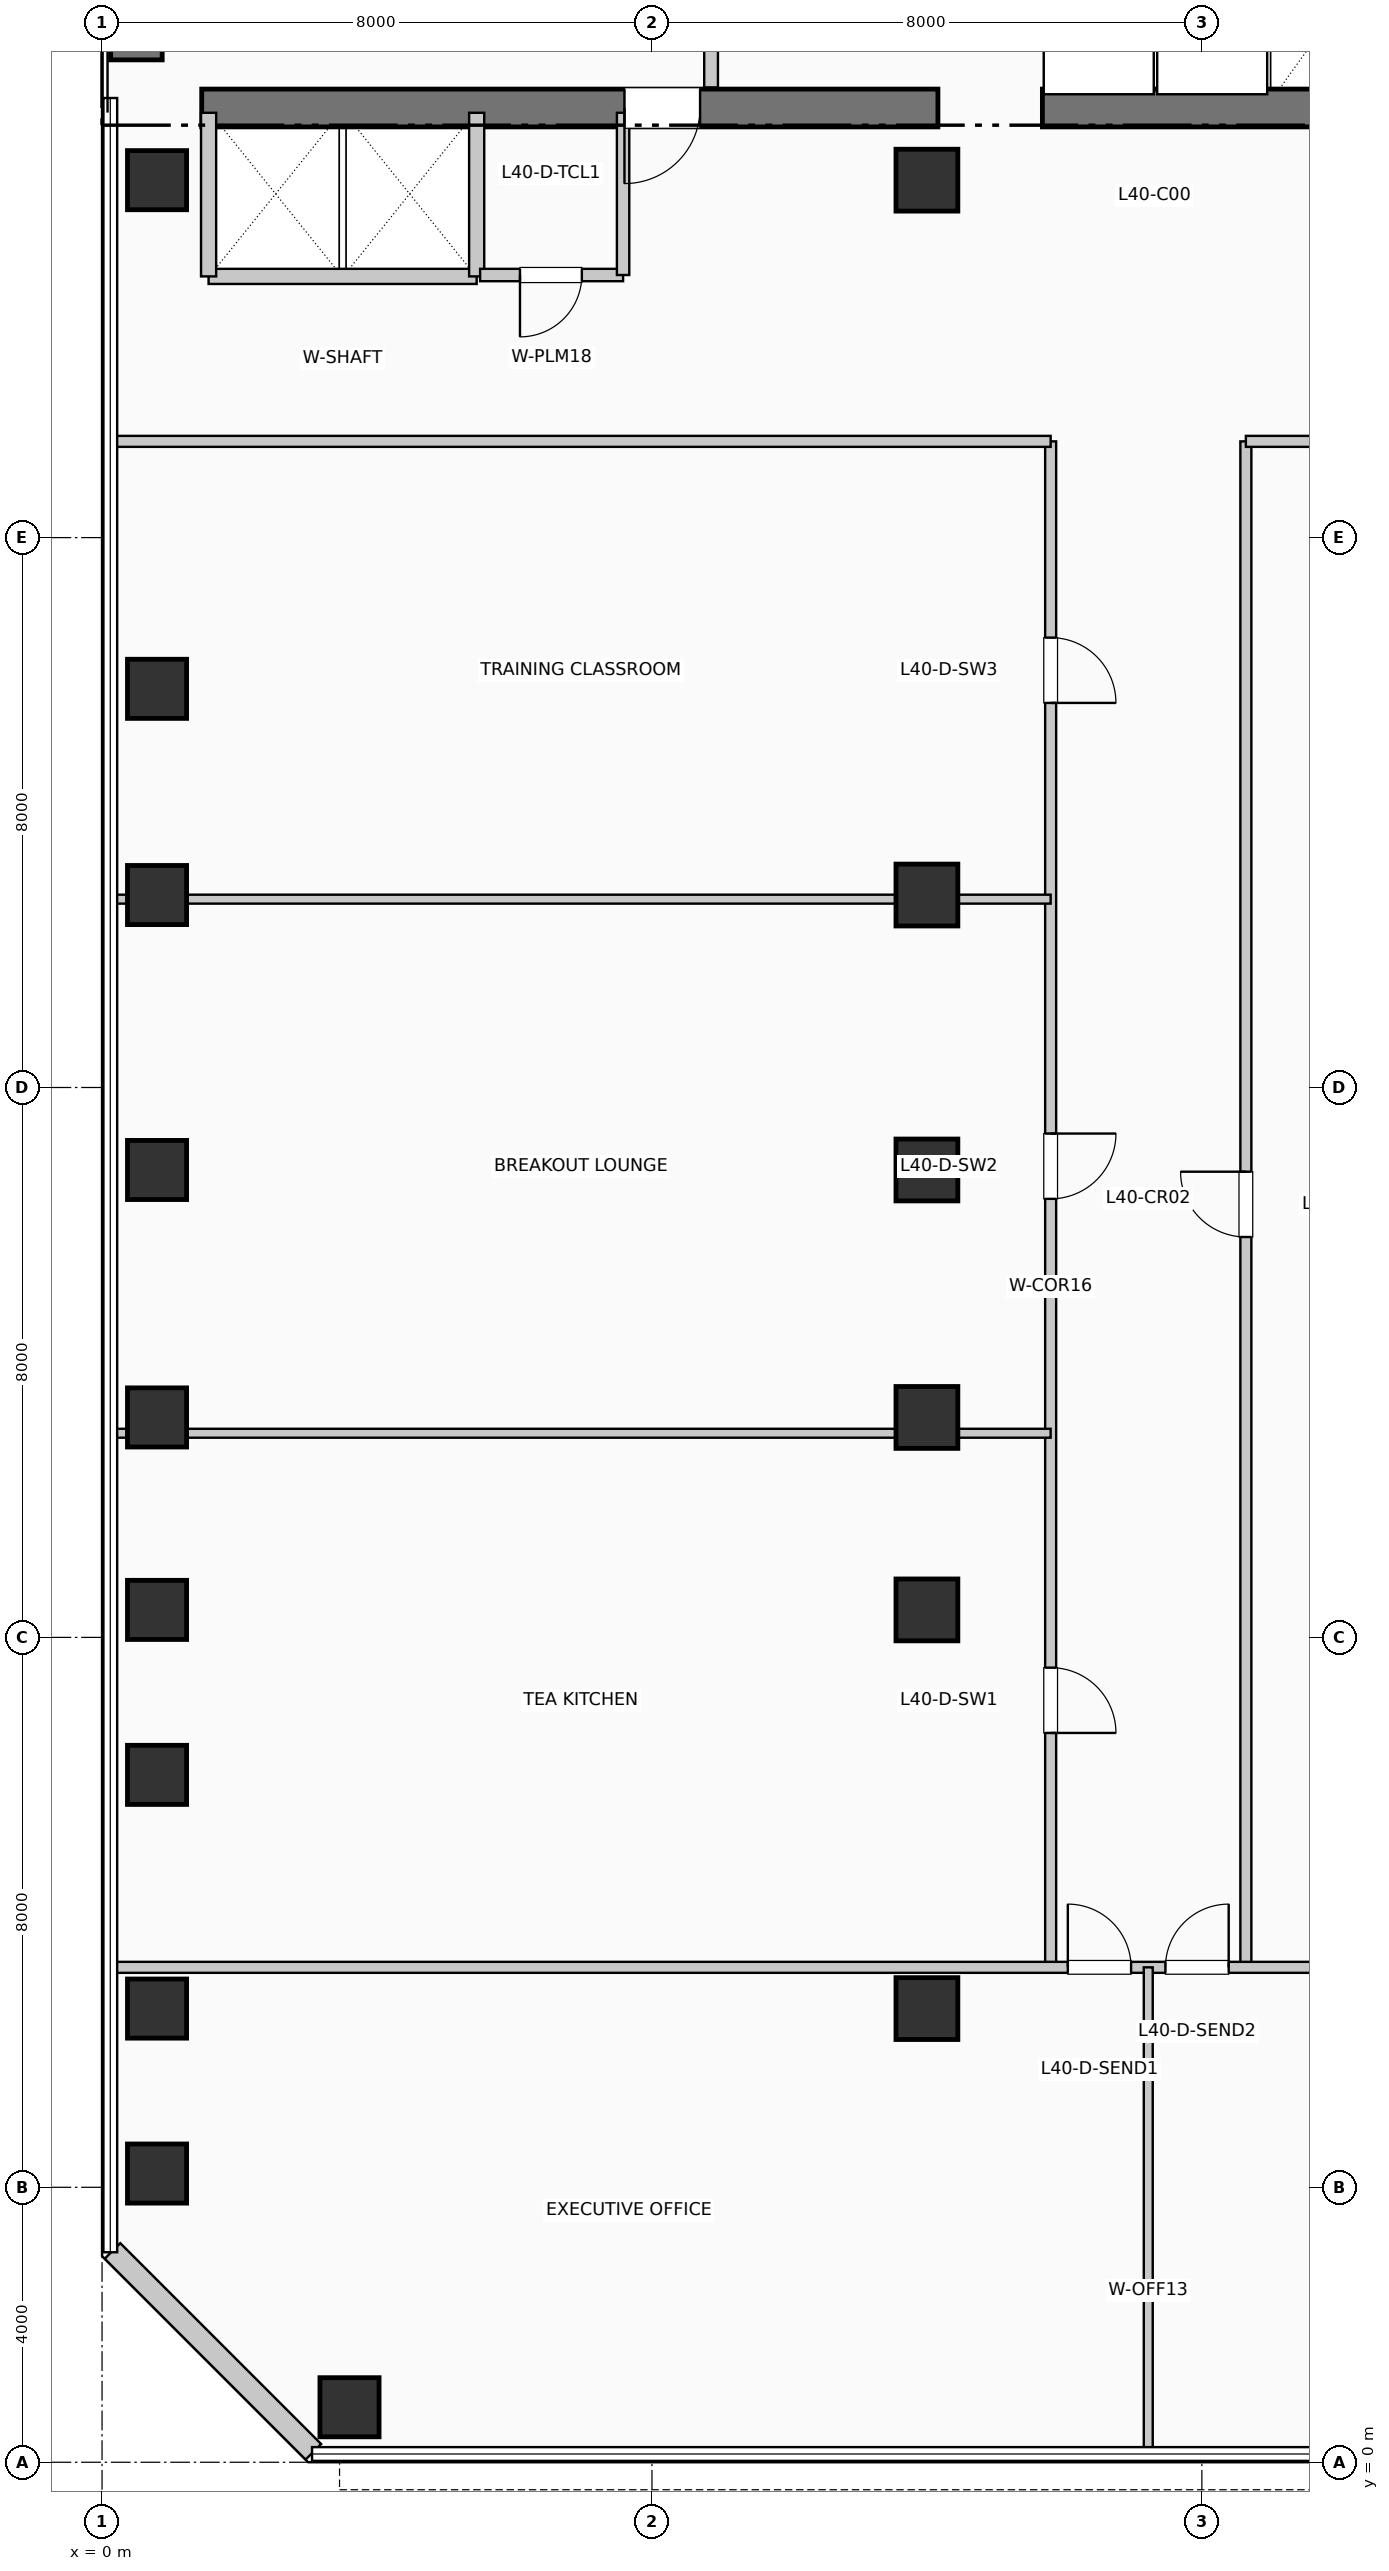
"""IFC4 building model, lengths in metres.
Left out: names, types, materials, properties, quantities, classifications, styles, units other than length and angle.
Written with IfcOpenShell. Run it as: python <this file> out.ifc"""

import sys

from ifc_helpers import new_model, si_unit, direction, frame, frame_2d, origin, origin_2d, place, context, subcontext, project, spatial, rectangle, extrude, element, fill, save


model = new_model("IFC4")
c1 = context("Model", 3, precision=1e-05, world=origin(), true_north=direction((0.0, 1.0)))
c2 = subcontext(c1, "Body", "Model", "MODEL_VIEW")
j1 = project(units=[si_unit("LENGTHUNIT", "METRE"), si_unit("PLANEANGLEUNIT", "RADIAN")], contexts=[c1])
p1 = place(None, origin())
s1 = spatial("IfcSite", under=j1, at=p1, CompositionType="ELEMENT")
p2 = place(p1, origin())
s2 = spatial("IfcBuilding", under=s1, at=p2, CompositionType="ELEMENT")
p3 = place(p2, frame((0.0, 0.0, 166.65)))
s3 = spatial("IfcBuildingStorey", under=s2, at=p3, CompositionType="ELEMENT", Elevation=166.65)
p4 = place(p3, frame((0.5, 34.95, 0.0), z_axis=(0.0, 0.0, 1.0), x_axis=(0.0, 1.0, 0.0)))
e1 = element("IfcWall", 1, at=p4, inside=s3, PredefinedType="SHEAR", context=c2, shape_type="SweptSolid", body=[
    extrude(rectangle(XDim=7.9, YDim=0.75, at=frame_2d((3.95, 0.0))), origin(), (0.0, 0.0, 1.0), 3.96),
])
p5 = place(p3, frame((1.45, 34.25, 0.0), z_axis=(0.0, 0.0, 1.0), x_axis=(1.0, 0.0, 0.0)))
e2 = element("IfcWall", 2, at=p5, inside=s3, PredefinedType="SHEAR", context=c2, shape_type="SweptSolid", body=[
    extrude(rectangle(XDim=10.71, YDim=0.55, at=frame_2d((5.355, 0.0))), origin(), (0.0, 0.0, 1.0), 3.96),
])
p6 = place(p5, frame((7.25, 0.0, 0.0), z_axis=(0.0, 0.0, 1.0), x_axis=(-1.0, 0.0, 0.0)))
e3 = element("IfcOpeningElement", 3, at=p6, cuts=e2, PredefinedType="OPENING", context=c2, shape_type="SweptSolid", body=[
    extrude(rectangle(XDim=1.1, YDim=2.15, at=frame_2d((0.55, 1.075))), frame((0.0, 0.285, 0.0), z_axis=(0.0, -1.0, 0.0), x_axis=(1.0, 0.0, 0.0)), (0.0, 0.0, 1.0), 0.57),
])
p7 = place(p3, frame((13.68, 34.25, 0.0), z_axis=(0.0, 0.0, 1.0), x_axis=(1.0, 0.0, 0.0)))
e4 = element("IfcWall", 4, at=p7, inside=s3, PredefinedType="SHEAR", context=c2, shape_type="SweptSolid", body=[
    extrude(rectangle(XDim=6.12, YDim=0.55, at=frame_2d((3.06, 0.0))), origin(), (0.0, 0.0, 1.0), 3.96),
])
for number, where, z_axis, x_axis in (
    (5, (0.8, 4.2, 0.0), (0.0, 0.0, 1.0), (1.0, 0.0, 0.0)),
    (6, (0.8, 6.6, 0.0), (0.0, 0.0, 1.0), (1.0, 0.0, 0.0)),
    (7, (0.8, 10.0, 0.0), (0.0, 0.0, 1.0), (1.0, 0.0, 0.0)),
    (8, (0.8, 12.4, 0.0), (0.0, 0.0, 1.0), (1.0, 0.0, 0.0)),
    (9, (0.8, 15.2, 0.0), (0.0, 0.0, 1.0), (1.0, 0.0, 0.0)),
    (10, (0.8, 18.8, 0.0), (0.0, 0.0, 1.0), (1.0, 0.0, 0.0)),
    (11, (0.8, 22.8, 0.0), (0.0, 0.0, 1.0), (1.0, 0.0, 0.0)),
    (12, (0.8, 25.8, 0.0), (0.0, 0.0, 1.0), (1.0, 0.0, 0.0)),
    (13, (0.8, 33.2, 0.0), (0.0, 0.0, 1.0), (1.0, 0.0, 0.0)),
    (14, (3.6, 0.8, 0.0), (0.0, 0.0, 1.0), (1.0, 0.0, 0.0)),
):
    element("IfcColumn", number, at=place(p3, frame(where, z_axis=z_axis, x_axis=x_axis)), inside=s3, PredefinedType="COLUMN", context=c2, shape_type="SweptSolid", body=[
        extrude(rectangle(XDim=0.86, YDim=0.86, at=origin_2d()), origin(), (0.0, 0.0, 1.0), 3.96),
    ])
for number, where, z_axis, x_axis in (
    (15, (12.0, 6.6, 0.0), (0.0, 0.0, 1.0), (1.0, 0.0, 0.0)),
    (16, (12.0, 12.4, 0.0), (0.0, 0.0, 1.0), (1.0, 0.0, 0.0)),
    (17, (12.0, 15.2, 0.0), (0.0, 0.0, 1.0), (1.0, 0.0, 0.0)),
    (18, (12.0, 18.8, 0.0), (0.0, 0.0, 1.0), (1.0, 0.0, 0.0)),
    (19, (12.0, 22.8, 0.0), (0.0, 0.0, 1.0), (1.0, 0.0, 0.0)),
    (20, (12.0, 33.2, 0.0), (0.0, 0.0, 1.0), (1.0, 0.0, 0.0)),
):
    element("IfcColumn", number, at=place(p3, frame(where, z_axis=z_axis, x_axis=x_axis)), inside=s3, PredefinedType="COLUMN", context=c2, shape_type="SweptSolid", body=[
        extrude(rectangle(XDim=0.9, YDim=0.9, at=origin_2d()), origin(), (0.0, 0.0, 1.0), 3.96),
    ])
p8 = place(p3, frame((0.152, 3.074, 0.0), z_axis=(0.0, 0.0, 1.0), x_axis=(0.707106781187, -0.707106781187, 0.0)))
e21 = element("IfcWall", 21, at=p8, inside=s3, PredefinedType="SOLIDWALL", context=c2, shape_type="SweptSolid", body=[
    extrude(rectangle(XDim=4.133, YDim=0.32, at=frame_2d((2.066, 0.0))), origin(), (0.0, 0.0, 1.0), 3.71),
])
p9 = place(p3, frame((8.86, 34.55, 0.0), z_axis=(0.0, 0.0, 1.0), x_axis=(0.0, 1.0, 0.0)))
e22 = element("IfcWall", 22, at=p9, inside=s3, PredefinedType="PARTITIONING", context=c2, shape_type="SweptSolid", body=[
    extrude(rectangle(XDim=2.5, YDim=0.2, at=frame_2d((1.25, 0.0))), origin(), (0.0, 0.0, 1.0), 3.71),
])
p10 = place(p3, frame((1.55, 31.8, 0.0), z_axis=(0.0, 0.0, 1.0), x_axis=(1.0, 0.0, 0.0)))
e23 = element("IfcWall", 23, at=p10, inside=s3, PredefinedType="PARTITIONING", context=c2, shape_type="SweptSolid", body=[
    extrude(rectangle(XDim=3.9, YDim=0.22, at=frame_2d((1.95, 0.0))), origin(), (0.0, 0.0, 1.0), 3.71),
])
for number, where, z_axis, x_axis in (
    (24, (1.55, 31.8, 0.0), (0.0, 0.0, 1.0), (0.0, 1.0, 0.0)),
    (25, (5.45, 31.8, 0.0), (0.0, 0.0, 1.0), (0.0, 1.0, 0.0)),
):
    element("IfcWall", number, at=place(p3, frame(where, z_axis=z_axis, x_axis=x_axis)), inside=s3, PredefinedType="PARTITIONING", context=c2, shape_type="SweptSolid", body=[
        extrude(rectangle(XDim=2.38, YDim=0.22, at=frame_2d((1.19, 0.0))), origin(), (0.0, 0.0, 1.0), 3.71),
    ])
p11 = place(p3, frame((5.5, 31.82, 0.0), z_axis=(0.0, 0.0, 1.0), x_axis=(1.0, 0.0, 0.0)))
e26 = element("IfcWall", 26, at=p11, inside=s3, PredefinedType="PLUMBINGWALL", context=c2, shape_type="SweptSolid", body=[
    extrude(rectangle(XDim=2.08, YDim=0.18, at=frame_2d((1.04, 0.0))), origin(), (0.0, 0.0, 1.0), 3.71),
])
p12 = place(p11, frame((1.48, 0.0, 0.0), z_axis=(0.0, 0.0, 1.0), x_axis=(-1.0, 0.0, 0.0)))
e27 = element("IfcOpeningElement", 27, at=p12, cuts=e26, PredefinedType="OPENING", context=c2, shape_type="SweptSolid", body=[
    extrude(rectangle(XDim=0.9, YDim=2.1, at=frame_2d((0.45, 1.05))), frame((0.0, 0.1, 0.0), z_axis=(0.0, -1.0, 0.0), x_axis=(1.0, 0.0, 0.0)), (0.0, 0.0, 1.0), 0.2),
])
p13 = place(p3, frame((7.58, 31.82, 0.0), z_axis=(0.0, 0.0, 1.0), x_axis=(0.0, 1.0, 0.0)))
e28 = element("IfcWall", 28, at=p13, inside=s3, PredefinedType="PLUMBINGWALL", context=c2, shape_type="SweptSolid", body=[
    extrude(rectangle(XDim=2.36, YDim=0.18, at=frame_2d((1.18, 0.0))), origin(), (0.0, 0.0, 1.0), 3.71),
])
p14 = place(p3, frame((13.8, 7.2, 0.0), z_axis=(0.0, 0.0, 1.0), x_axis=(0.0, 1.0, 0.0)))
e29 = element("IfcWall", 29, at=p14, inside=s3, PredefinedType="PARTITIONING", context=c2, shape_type="SweptSolid", body=[
    extrude(rectangle(XDim=22.2, YDim=0.16, at=frame_2d((11.1, 0.0))), origin(), (0.0, 0.0, 1.0), 3.71),
])
p15 = place(p14, frame((4.36, 0.0, 0.0), z_axis=(0.0, 0.0, 1.0), x_axis=(-1.0, 0.0, 0.0)))
e30 = element("IfcOpeningElement", 30, at=p15, cuts=e29, PredefinedType="OPENING", context=c2, shape_type="SweptSolid", body=[
    extrude(rectangle(XDim=0.95, YDim=2.15, at=frame_2d((0.475, 1.075))), frame((0.0, 0.09, 0.0), z_axis=(0.0, -1.0, 0.0), x_axis=(1.0, 0.0, 0.0)), (0.0, 0.0, 1.0), 0.18),
])
p16 = place(p14, frame((12.13, 0.0, 0.0), z_axis=(0.0, 0.0, 1.0), x_axis=(-1.0, 0.0, 0.0)))
e31 = element("IfcOpeningElement", 31, at=p16, cuts=e29, PredefinedType="OPENING", context=c2, shape_type="SweptSolid", body=[
    extrude(rectangle(XDim=0.95, YDim=2.15, at=frame_2d((0.475, 1.075))), frame((0.0, 0.09, 0.0), z_axis=(0.0, -1.0, 0.0), x_axis=(1.0, 0.0, 0.0)), (0.0, 0.0, 1.0), 0.18),
])
p17 = place(p14, frame((19.345, 0.0, 0.0), z_axis=(0.0, 0.0, 1.0), x_axis=(-1.0, 0.0, 0.0)))
e32 = element("IfcOpeningElement", 32, at=p17, cuts=e29, PredefinedType="OPENING", context=c2, shape_type="SweptSolid", body=[
    extrude(rectangle(XDim=0.95, YDim=2.15, at=frame_2d((0.475, 1.075))), frame((0.0, 0.09, 0.0), z_axis=(0.0, -1.0, 0.0), x_axis=(1.0, 0.0, 0.0)), (0.0, 0.0, 1.0), 0.18),
])
p18 = place(p3, frame((16.64, 7.2, 0.0), z_axis=(0.0, 0.0, 1.0), x_axis=(0.0, 1.0, 0.0)))
e33 = element("IfcWall", 33, at=p18, inside=s3, PredefinedType="PARTITIONING", context=c2, shape_type="SweptSolid", body=[
    extrude(rectangle(XDim=22.2, YDim=0.16, at=frame_2d((11.1, 0.0))), origin(), (0.0, 0.0, 1.0), 3.71),
])
p19 = place(p18, frame((10.625, 0.0, 0.0)))
e34 = element("IfcOpeningElement", 34, at=p19, cuts=e33, PredefinedType="OPENING", context=c2, shape_type="SweptSolid", body=[
    extrude(rectangle(XDim=0.95, YDim=2.15, at=frame_2d((0.475, 1.075))), frame((0.0, 0.09, 0.0), z_axis=(0.0, -1.0, 0.0), x_axis=(1.0, 0.0, 0.0)), (0.0, 0.0, 1.0), 0.18),
])
p20 = place(p3, frame((0.19, 7.2, 0.0), z_axis=(0.0, 0.0, 1.0), x_axis=(1.0, 0.0, 0.0)))
e35 = element("IfcWall", 35, at=p20, inside=s3, PredefinedType="PARTITIONING", context=c2, shape_type="SweptSolid", body=[
    extrude(rectangle(XDim=23.26, YDim=0.16, at=frame_2d((11.63, 0.0))), origin(), (0.0, 0.0, 1.0), 3.71),
])
p21 = place(p20, frame((13.86, 0.0, 0.0)))
e36 = element("IfcOpeningElement", 36, at=p21, cuts=e35, PredefinedType="OPENING", context=c2, shape_type="SweptSolid", body=[
    extrude(rectangle(XDim=0.92, YDim=2.1, at=frame_2d((0.46, 1.05))), frame((0.0, 0.09, 0.0), z_axis=(0.0, -1.0, 0.0), x_axis=(1.0, 0.0, 0.0)), (0.0, 0.0, 1.0), 0.18),
])
p22 = place(p20, frame((15.28, 0.0, 0.0)))
e37 = element("IfcOpeningElement", 37, at=p22, cuts=e35, PredefinedType="OPENING", context=c2, shape_type="SweptSolid", body=[
    extrude(rectangle(XDim=0.92, YDim=2.1, at=frame_2d((0.46, 1.05))), frame((0.0, 0.09, 0.0), z_axis=(0.0, -1.0, 0.0), x_axis=(1.0, 0.0, 0.0)), (0.0, 0.0, 1.0), 0.18),
])
p23 = place(p3, frame((0.19, 29.4, 0.0), z_axis=(0.0, 0.0, 1.0), x_axis=(1.0, 0.0, 0.0)))
e38 = element("IfcWall", 38, at=p23, inside=s3, PredefinedType="PARTITIONING", context=c2, shape_type="SweptSolid", body=[
    extrude(rectangle(XDim=13.61, YDim=0.16, at=frame_2d((6.805, 0.0))), origin(), (0.0, 0.0, 1.0), 3.365),
])
p24 = place(p3, frame((16.64, 29.4, 0.0), z_axis=(0.0, 0.0, 1.0), x_axis=(1.0, 0.0, 0.0)))
e39 = element("IfcWall", 39, at=p24, inside=s3, PredefinedType="PARTITIONING", context=c2, shape_type="SweptSolid", body=[
    extrude(rectangle(XDim=6.81, YDim=0.16, at=frame_2d((3.405, 0.0))), origin(), (0.0, 0.0, 1.0), 3.71),
])
p25 = place(p3, frame((15.22, 0.19, 0.0), z_axis=(0.0, 0.0, 1.0), x_axis=(0.0, 1.0, 0.0)))
e40 = element("IfcWall", 40, at=p25, inside=s3, PredefinedType="PARTITIONING", context=c2, shape_type="SweptSolid", body=[
    extrude(rectangle(XDim=7.01, YDim=0.13, at=frame_2d((3.505, 0.0))), origin(), (0.0, 0.0, 1.0), 3.71),
])
for number, where, z_axis, x_axis in (
    (41, (0.19, 14.97, 0.0), (0.0, 0.0, 1.0), (1.0, 0.0, 0.0)),
    (42, (0.19, 22.74, 0.0), (0.0, 0.0, 1.0), (1.0, 0.0, 0.0)),
):
    element("IfcWall", number, at=place(p3, frame(where, z_axis=z_axis, x_axis=x_axis)), inside=s3, PredefinedType="PARTITIONING", context=c2, shape_type="SweptSolid", body=[
        extrude(rectangle(XDim=13.61, YDim=0.13, at=frame_2d((6.805, 0.0))), origin(), (0.0, 0.0, 1.0), 3.045),
    ])
p26 = place(p6, origin())
e43 = element("IfcDoor", 43, at=p26, inside=s3, OperationType="SINGLE_SWING_LEFT", PredefinedType="DOOR", context=c2, shape_type="SweptSolid", body=[
    extrude(rectangle(XDim=1.1, YDim=2.15, at=frame_2d((0.55, 1.075))), frame((0.0, 0.025, 0.0), z_axis=(0.0, -1.0, 0.0), x_axis=(1.0, 0.0, 0.0)), (0.0, 0.0, 1.0), 0.05),
])
fill(e3, e43)
p27 = place(p12, origin())
e44 = element("IfcDoor", 44, at=p27, inside=s3, OperationType="SINGLE_SWING_LEFT", PredefinedType="DOOR", context=c2, shape_type="SweptSolid", body=[
    extrude(rectangle(XDim=0.9, YDim=2.1, at=frame_2d((0.45, 1.05))), frame((0.0, 0.025, 0.0), z_axis=(0.0, -1.0, 0.0), x_axis=(1.0, 0.0, 0.0)), (0.0, 0.0, 1.0), 0.05),
])
fill(e27, e44)
p28 = place(p21, origin())
e45 = element("IfcDoor", 45, at=p28, inside=s3, OperationType="SINGLE_SWING_LEFT", PredefinedType="DOOR", context=c2, shape_type="SweptSolid", body=[
    extrude(rectangle(XDim=0.92, YDim=2.1, at=frame_2d((0.46, 1.05))), frame((0.0, 0.025, 0.0), z_axis=(0.0, -1.0, 0.0), x_axis=(1.0, 0.0, 0.0)), (0.0, 0.0, 1.0), 0.05),
])
fill(e36, e45)
p29 = place(p22, origin())
e46 = element("IfcDoor", 46, at=p29, inside=s3, OperationType="SINGLE_SWING_RIGHT", PredefinedType="DOOR", context=c2, shape_type="SweptSolid", body=[
    extrude(rectangle(XDim=0.92, YDim=2.1, at=frame_2d((0.46, 1.05))), frame((0.0, 0.025, 0.0), z_axis=(0.0, -1.0, 0.0), x_axis=(1.0, 0.0, 0.0)), (0.0, 0.0, 1.0), 0.05),
])
fill(e37, e46)
p30 = place(p15, origin())
e47 = element("IfcDoor", 47, at=p30, inside=s3, OperationType="SINGLE_SWING_LEFT", PredefinedType="DOOR", context=c2, shape_type="SweptSolid", body=[
    extrude(rectangle(XDim=0.95, YDim=2.15, at=frame_2d((0.475, 1.075))), frame((0.0, 0.025, 0.0), z_axis=(0.0, -1.0, 0.0), x_axis=(1.0, 0.0, 0.0)), (0.0, 0.0, 1.0), 0.05),
])
fill(e30, e47)
p31 = place(p16, origin())
e48 = element("IfcDoor", 48, at=p31, inside=s3, OperationType="SINGLE_SWING_RIGHT", PredefinedType="DOOR", context=c2, shape_type="SweptSolid", body=[
    extrude(rectangle(XDim=0.95, YDim=2.15, at=frame_2d((0.475, 1.075))), frame((0.0, 0.025, 0.0), z_axis=(0.0, -1.0, 0.0), x_axis=(1.0, 0.0, 0.0)), (0.0, 0.0, 1.0), 0.05),
])
fill(e31, e48)
p32 = place(p17, origin())
e49 = element("IfcDoor", 49, at=p32, inside=s3, OperationType="SINGLE_SWING_LEFT", PredefinedType="DOOR", context=c2, shape_type="SweptSolid", body=[
    extrude(rectangle(XDim=0.95, YDim=2.15, at=frame_2d((0.475, 1.075))), frame((0.0, 0.025, 0.0), z_axis=(0.0, -1.0, 0.0), x_axis=(1.0, 0.0, 0.0)), (0.0, 0.0, 1.0), 0.05),
])
fill(e32, e49)
p33 = place(p19, origin())
e50 = element("IfcDoor", 50, at=p33, inside=s3, OperationType="SINGLE_SWING_RIGHT", PredefinedType="DOOR", context=c2, shape_type="SweptSolid", body=[
    extrude(rectangle(XDim=0.95, YDim=2.15, at=frame_2d((0.475, 1.075))), frame((0.0, 0.025, 0.0), z_axis=(0.0, -1.0, 0.0), x_axis=(1.0, 0.0, 0.0)), (0.0, 0.0, 1.0), 0.05),
])
fill(e34, e50)
save(model, sys.argv[1])
